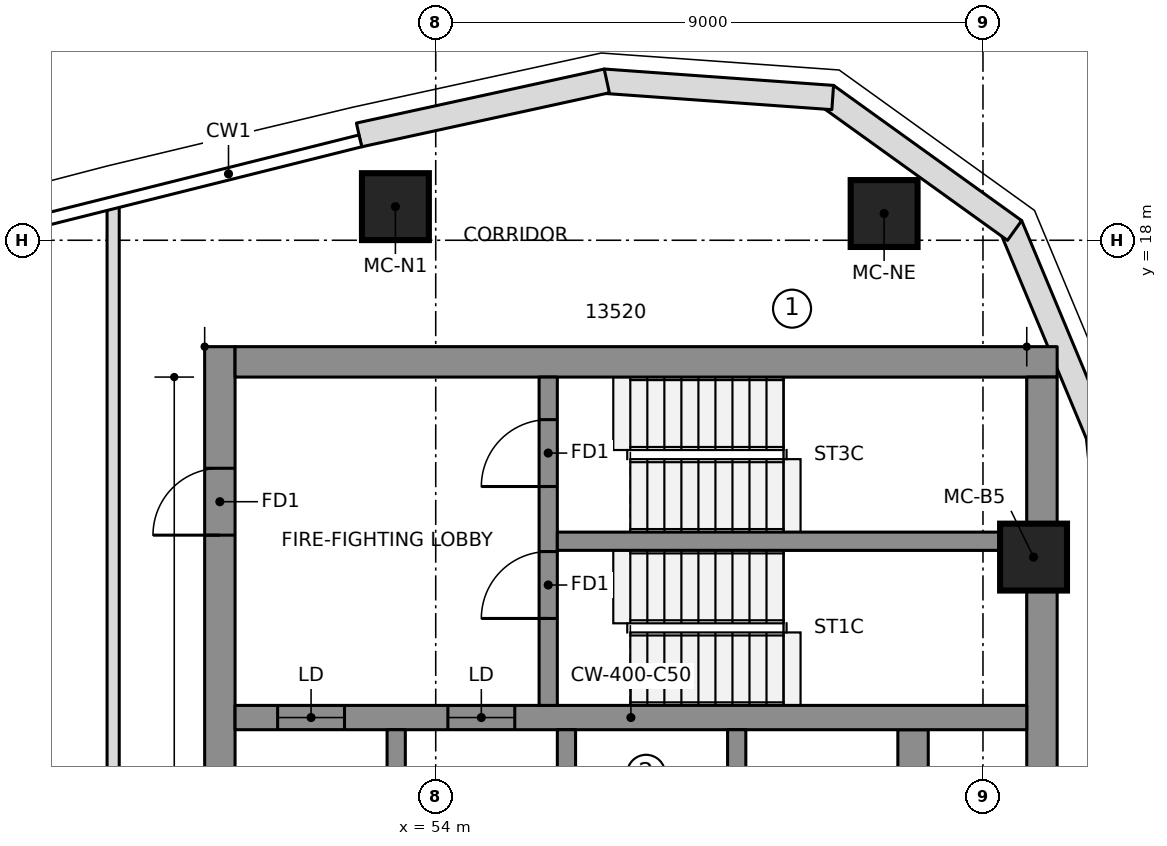
"""IFC4 building model, lengths in metres.
Left out: names, types, materials, properties, quantities, classifications, styles, units other than length and angle.
Written with IfcOpenShell. Run it as: python <this file> out.ifc"""

import sys

from ifc_helpers import new_model, si_unit, direction, frame, frame_2d, origin, origin_2d, place, context, subcontext, project, spatial, polyline, rectangle, outline, extrude, element, fill, save


model = new_model("IFC4")
c1 = context("Model", 3, precision=1e-05, world=origin(), true_north=direction((0.0, 1.0)))
c2 = subcontext(c1, "Body", "Model", "MODEL_VIEW")
j1 = project(units=[si_unit("LENGTHUNIT", "METRE"), si_unit("PLANEANGLEUNIT", "RADIAN")], contexts=[c1])
p1 = place(None, origin())
s1 = spatial("IfcSite", under=j1, at=p1, CompositionType="ELEMENT")
p2 = place(p1, origin())
s2 = spatial("IfcBuilding", under=s1, at=p2, CompositionType="ELEMENT")
p3 = place(p2, frame((0.0, 0.0, 282.1)))
s3 = spatial("IfcBuildingStorey", under=s2, at=p3, CompositionType="ELEMENT", Elevation=282.1)
p4 = place(p3, frame((50.45, 6.65, 0.0), z_axis=(0.0, 0.0, 1.0), x_axis=(0.0, 1.0, 0.0)))
e1 = element("IfcWall", 1, at=p4, inside=s3, PredefinedType="SHEAR", context=c2, shape_type="SweptSolid", body=[
    extrude(rectangle(XDim=9.6, YDim=0.5, at=frame_2d((4.8, 0.0))), origin(), (0.0, 0.0, 1.0), 3.55),
])
p5 = place(p4, frame((6.5, 0.0, 0.0)))
e2 = element("IfcOpeningElement", 2, at=p5, cuts=e1, PredefinedType="OPENING", context=c2, shape_type="SweptSolid", body=[
    extrude(rectangle(XDim=1.1, YDim=2.1, at=frame_2d((0.55, 1.05))), frame((0.0, 0.26, 0.0), z_axis=(0.0, -1.0, 0.0), x_axis=(1.0, 0.0, 0.0)), (0.0, 0.0, 1.0), 0.52),
])
p6 = place(p3, frame((50.7, 16.0, 0.0), z_axis=(0.0, 0.0, 1.0), x_axis=(1.0, 0.0, 0.0)))
e3 = element("IfcWall", 3, at=p6, inside=s3, PredefinedType="SHEAR", context=c2, shape_type="SweptSolid", body=[
    extrude(rectangle(XDim=13.52, YDim=0.5, at=frame_2d((6.76, 0.0))), origin(), (0.0, 0.0, 1.0), 3.55),
])
p7 = place(p3, frame((63.97, 6.903, 0.0), z_axis=(0.0, 0.0, 1.0), x_axis=(0.0, 1.0, 0.0)))
e4 = element("IfcWall", 4, at=p7, inside=s3, PredefinedType="SHEAR", context=c2, shape_type="SweptSolid", body=[
    extrude(rectangle(XDim=8.847, YDim=0.5, at=frame_2d((4.423, 0.0))), origin(), (0.0, 0.0, 1.0), 3.55),
])
p8 = place(p3, frame((61.85, -9.95, 0.0), z_axis=(0.0, 0.0, 1.0), x_axis=(0.0, 1.0, 0.0)))
e5 = element("IfcWall", 5, at=p8, inside=s3, PredefinedType="SHEAR", context=c2, shape_type="SweptSolid", body=[
    extrude(rectangle(XDim=19.9, YDim=0.5, at=frame_2d((9.95, 0.0))), origin(), (0.0, 0.0, 1.0), 3.55),
])
p9 = place(p3, frame((50.7, 10.15, 0.0), z_axis=(0.0, 0.0, 1.0), x_axis=(1.0, 0.0, 0.0)))
e6 = element("IfcWall", 6, at=p9, inside=s3, PredefinedType="SHEAR", context=c2, shape_type="SweptSolid", body=[
    extrude(rectangle(XDim=13.02, YDim=0.4, at=frame_2d((6.51, 0.0))), origin(), (0.0, 0.0, 1.0), 3.55),
])
p10 = place(p9, frame((0.7, 0.0, 0.0)))
e7 = element("IfcOpeningElement", 7, at=p10, cuts=e6, PredefinedType="OPENING", context=c2, shape_type="SweptSolid", body=[
    extrude(rectangle(XDim=1.1, YDim=2.1, at=frame_2d((0.55, 1.05))), frame((0.0, 0.21, 0.0), z_axis=(0.0, -1.0, 0.0), x_axis=(1.0, 0.0, 0.0)), (0.0, 0.0, 1.0), 0.42),
])
p11 = place(p9, frame((3.5, 0.0, 0.0)))
e8 = element("IfcOpeningElement", 8, at=p11, cuts=e6, PredefinedType="OPENING", context=c2, shape_type="SweptSolid", body=[
    extrude(rectangle(XDim=1.1, YDim=2.1, at=frame_2d((0.55, 1.05))), frame((0.0, 0.21, 0.0), z_axis=(0.0, -1.0, 0.0), x_axis=(1.0, 0.0, 0.0)), (0.0, 0.0, 1.0), 0.42),
])
for number, where, z_axis, x_axis in (
    (9, (53.35, 6.95, 0.0), (0.0, 0.0, 1.0), (0.0, 1.0, 0.0)),
    (10, (56.15, 6.95, 0.0), (0.0, 0.0, 1.0), (0.0, 1.0, 0.0)),
    (11, (58.95, 6.95, 0.0), (0.0, 0.0, 1.0), (0.0, 1.0, 0.0)),
):
    element("IfcWall", number, at=place(p3, frame(where, z_axis=z_axis, x_axis=x_axis)), inside=s3, PredefinedType="SHEAR", context=c2, shape_type="SweptSolid", body=[
        extrude(rectangle(XDim=3.0, YDim=0.3, at=frame_2d((1.5, 0.0))), origin(), (0.0, 0.0, 1.0), 3.55),
    ])
p12 = place(p3, frame((55.85, 10.35, 0.0), z_axis=(0.0, 0.0, 1.0), x_axis=(0.0, 1.0, 0.0)))
e12 = element("IfcWall", 12, at=p12, inside=s3, PredefinedType="SHEAR", context=c2, shape_type="SweptSolid", body=[
    extrude(rectangle(XDim=5.4, YDim=0.3, at=frame_2d((2.7, 0.0))), origin(), (0.0, 0.0, 1.0), 3.55),
])
p13 = place(p12, frame((1.43, 0.0, 0.0)))
e13 = element("IfcOpeningElement", 13, at=p13, cuts=e12, PredefinedType="OPENING", context=c2, shape_type="SweptSolid", body=[
    extrude(rectangle(XDim=1.1, YDim=2.1, at=frame_2d((0.55, 1.05))), frame((0.0, 0.16, 0.0), z_axis=(0.0, -1.0, 0.0), x_axis=(1.0, 0.0, 0.0)), (0.0, 0.0, 1.0), 0.32),
])
p14 = place(p12, frame((3.6, 0.0, 0.0)))
e14 = element("IfcOpeningElement", 14, at=p14, cuts=e12, PredefinedType="OPENING", context=c2, shape_type="SweptSolid", body=[
    extrude(rectangle(XDim=1.1, YDim=2.1, at=frame_2d((0.55, 1.05))), frame((0.0, 0.16, 0.0), z_axis=(0.0, -1.0, 0.0), x_axis=(1.0, 0.0, 0.0)), (0.0, 0.0, 1.0), 0.32),
])
p15 = place(p3, frame((56.0, 13.05, 0.0), z_axis=(0.0, 0.0, 1.0), x_axis=(1.0, 0.0, 0.0)))
e15 = element("IfcWall", 15, at=p15, inside=s3, PredefinedType="SHEAR", context=c2, shape_type="SweptSolid", body=[
    extrude(rectangle(XDim=7.72, YDim=0.3, at=frame_2d((3.86, 0.0))), origin(), (0.0, 0.0, 1.0), 3.55),
])
for number, where, z_axis, x_axis in (
    (16, (63.832, 12.789, 0.0), (0.0, 0.0, 1.0), (1.0, 0.0, 0.0)),
    (17, (61.374, 18.44, 0.0), (0.0, 0.0, 1.0), (1.0, 0.0, 0.0)),
    (18, (53.337, 18.553, 0.0), (0.0, 0.0, 1.0), (1.0, 0.0, 0.0)),
):
    element("IfcColumn", number, at=place(p3, frame(where, z_axis=z_axis, x_axis=x_axis)), inside=s3, PredefinedType="COLUMN", context=c2, shape_type="SweptSolid", body=[
        extrude(rectangle(XDim=1.1, YDim=1.1, at=origin_2d()), origin(), (0.0, 0.0, 1.0), 3.55),
    ])
p16 = place(p3, frame((65.331, 10.571, 0.0), z_axis=(0.0, 0.0, 1.0), x_axis=(-0.102249826987, 0.994758751096, 0.0)))
e19 = element("IfcWall", 19, at=p16, inside=s3, PredefinedType="NOTDEFINED", context=c2, shape_type="SweptSolid", body=[
    extrude(outline(polyline([(-0.003, -0.2), (4.263, -0.2), (4.204, 0.2), (0.003, 0.2), (-0.003, -0.2)])), origin(), (0.0, 0.0, 1.0), 3.25),
])
p17 = place(p3, frame((64.898, 14.782, 0.0), z_axis=(0.0, 0.0, 1.0), x_axis=(-0.385285857918, 0.922797273343, 0.0)))
e20 = element("IfcWall", 20, at=p17, inside=s3, PredefinedType="NOTDEFINED", context=c2, shape_type="SweptSolid", body=[
    extrude(outline(polyline([(-0.03, -0.2), (3.753, -0.2), (3.64, 0.2), (0.03, 0.2), (-0.03, -0.2)])), origin(), (0.0, 0.0, 1.0), 3.25),
])
p18 = place(p3, frame((63.474, 18.194, 0.0), z_axis=(0.0, 0.0, 1.0), x_axis=(-0.811962548682, 0.583709533533, 0.0)))
e21 = element("IfcWall", 21, at=p18, inside=s3, PredefinedType="NOTDEFINED", context=c2, shape_type="SweptSolid", body=[
    extrude(outline(polyline([(-0.057, -0.2), (3.753, -0.2), (3.64, 0.2), (0.057, 0.2), (-0.057, -0.2)])), origin(), (0.0, 0.0, 1.0), 3.25),
])
p19 = place(p3, frame((60.472, 20.352, 0.0), z_axis=(0.0, 0.0, 1.0), x_axis=(-0.99746272096, 0.071190731806, 0.0)))
e22 = element("IfcWall", 22, at=p19, inside=s3, PredefinedType="NOTDEFINED", context=c2, shape_type="SweptSolid", body=[
    extrude(outline(polyline([(-0.057, -0.2), (3.726, -0.2), (3.668, 0.2), (0.057, 0.2), (-0.057, -0.2)])), origin(), (0.0, 0.0, 1.0), 3.25),
])
p20 = place(p3, frame((56.785, 20.615, 0.0), z_axis=(0.0, 0.0, 1.0), x_axis=(-0.977020225348, -0.213146614471, 0.0)))
e23 = element("IfcWall", 23, at=p20, inside=s3, PredefinedType="NOTDEFINED", context=c2, shape_type="SweptSolid", body=[
    extrude(outline(polyline([(-0.029, -0.2), (4.142, -0.2), (4.142, 0.2), (0.029, 0.2), (-0.029, -0.2)])), origin(), (0.0, 0.0, 1.0), 3.25),
])
p21 = place(p3, frame((48.695, 18.553, 0.0), z_axis=(0.0, 0.0, 1.0), x_axis=(0.0, -1.0, 0.0)))
e24 = element("IfcWall", 24, at=p21, inside=s3, PredefinedType="PARTITIONING", context=c2, shape_type="SweptSolid", body=[
    extrude(rectangle(XDim=9.997, YDim=0.2, at=frame_2d((4.998, 0.0))), origin(), (0.0, 0.0, 1.0), 3.25),
])
p22 = place(p10, origin())
e25 = element("IfcDoor", 25, at=p22, inside=s3, OperationType="DOUBLE_DOOR_SLIDING", PredefinedType="DOOR", context=c2, shape_type="SweptSolid", body=[
    extrude(rectangle(XDim=1.1, YDim=2.1, at=frame_2d((0.55, 1.05))), frame((0.0, 0.025, 0.0), z_axis=(0.0, -1.0, 0.0), x_axis=(1.0, 0.0, 0.0)), (0.0, 0.0, 1.0), 0.05),
])
fill(e7, e25)
p23 = place(p11, origin())
e26 = element("IfcDoor", 26, at=p23, inside=s3, OperationType="DOUBLE_DOOR_SLIDING", PredefinedType="DOOR", context=c2, shape_type="SweptSolid", body=[
    extrude(rectangle(XDim=1.1, YDim=2.1, at=frame_2d((0.55, 1.05))), frame((0.0, 0.025, 0.0), z_axis=(0.0, -1.0, 0.0), x_axis=(1.0, 0.0, 0.0)), (0.0, 0.0, 1.0), 0.05),
])
fill(e8, e26)
p24 = place(p13, origin())
e27 = element("IfcDoor", 27, at=p24, inside=s3, OperationType="SINGLE_SWING_RIGHT", PredefinedType="DOOR", context=c2, shape_type="SweptSolid", body=[
    extrude(rectangle(XDim=1.1, YDim=2.1, at=frame_2d((0.55, 1.05))), frame((0.0, 0.025, 0.0), z_axis=(0.0, -1.0, 0.0), x_axis=(1.0, 0.0, 0.0)), (0.0, 0.0, 1.0), 0.05),
])
fill(e13, e27)
p25 = place(p14, origin())
e28 = element("IfcDoor", 28, at=p25, inside=s3, OperationType="SINGLE_SWING_RIGHT", PredefinedType="DOOR", context=c2, shape_type="SweptSolid", body=[
    extrude(rectangle(XDim=1.1, YDim=2.1, at=frame_2d((0.55, 1.05))), frame((0.0, 0.025, 0.0), z_axis=(0.0, -1.0, 0.0), x_axis=(1.0, 0.0, 0.0)), (0.0, 0.0, 1.0), 0.05),
])
fill(e14, e28)
p26 = place(p5, origin())
e29 = element("IfcDoor", 29, at=p26, inside=s3, OperationType="SINGLE_SWING_RIGHT", PredefinedType="DOOR", context=c2, shape_type="SweptSolid", body=[
    extrude(rectangle(XDim=1.1, YDim=2.1, at=frame_2d((0.55, 1.05))), frame((0.0, 0.025, 0.0), z_axis=(0.0, -1.0, 0.0), x_axis=(1.0, 0.0, 0.0)), (0.0, 0.0, 1.0), 0.05),
])
fill(e2, e29)
save(model, sys.argv[1])
